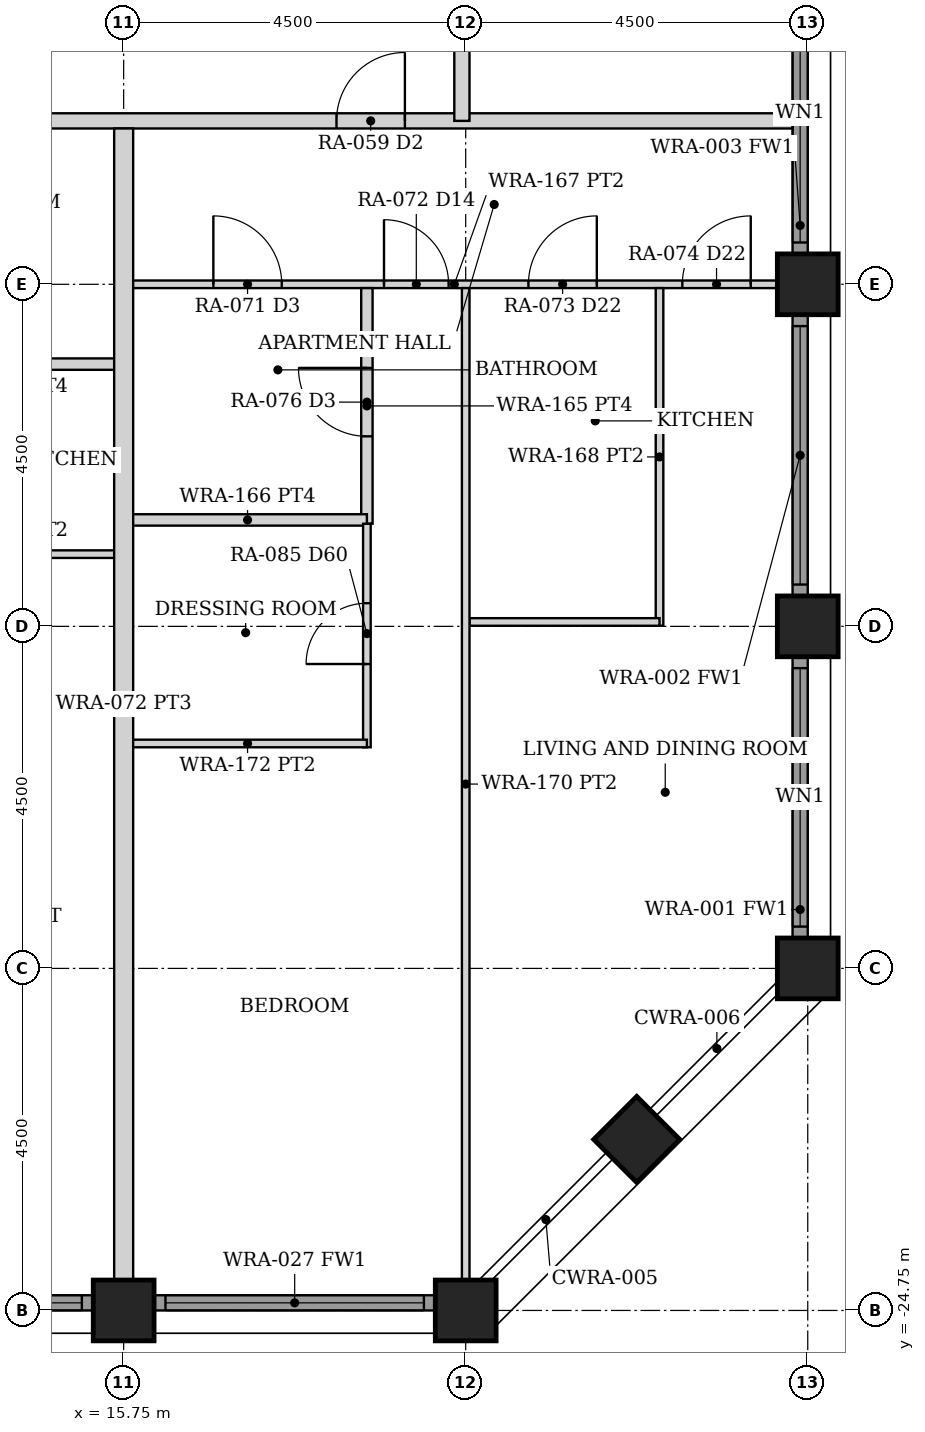
"""IFC4 building model, lengths in metres.
Left out: names, types, materials, properties, quantities, classifications, styles, units other than length and angle.
Written with IfcOpenShell. Run it as: python <this file> out.ifc"""

import sys

from ifc_helpers import new_model, si_unit, direction, frame, frame_2d, origin, origin_2d, place, context, subcontext, project, spatial, rectangle, hollow_rectangle, extrude, element, fill, save


model = new_model("IFC4")
c1 = context("Model", 3, precision=1e-05, world=origin(), true_north=direction((0.0, 1.0)))
c2 = subcontext(c1, "Body", "Model", "MODEL_VIEW")
j1 = project(units=[si_unit("LENGTHUNIT", "METRE"), si_unit("PLANEANGLEUNIT", "RADIAN")], contexts=[c1])
p1 = place(None, origin())
s1 = spatial("IfcSite", under=j1, at=p1, CompositionType="ELEMENT")
p2 = place(p1, origin())
s2 = spatial("IfcBuilding", under=s1, at=p2, CompositionType="ELEMENT")
p3 = place(p2, frame((0.0, 0.0, 30.0)))
s3 = spatial("IfcBuildingStorey", under=s2, at=p3, CompositionType="ELEMENT", Elevation=30.0)
for number, where, z_axis, x_axis in (
    (1, (24.75, -20.25, 0.0), (0.0, 0.0, 1.0), (1.0, 0.0, 0.0)),
    (2, (24.75, -15.75, 0.0), (0.0, 0.0, 1.0), (1.0, 0.0, 0.0)),
    (3, (24.75, -11.25, 0.0), (0.0, 0.0, 1.0), (1.0, 0.0, 0.0)),
    (4, (15.75, -24.75, 0.0), (0.0, 0.0, 1.0), (0.0, 1.0, 0.0)),
    (5, (20.25, -24.75, 0.0), (0.0, 0.0, 1.0), (0.0, 1.0, 0.0)),
    (6, (22.5, -22.5, 0.0), (0.0, 0.0, 1.0), (0.707, -0.707, 0.0)),
):
    element("IfcColumn", number, at=place(p3, frame(where, z_axis=z_axis, x_axis=x_axis)), inside=s3, PredefinedType="COLUMN", context=c2, shape_type="SweptSolid", body=[
        extrude(hollow_rectangle(XDim=0.8, YDim=0.8, WallThickness=0.08, at=origin_2d()), origin(), (0.0, 0.0, 1.0), 3.5),
    ])
p4 = place(p3, frame((11.655, -24.65, 0.0), z_axis=(0.0, 0.0, 1.0), x_axis=(1.0, 0.0, 0.0)))
e7 = element("IfcWall", 7, at=p4, inside=s3, PredefinedType="SOLIDWALL", context=c2, shape_type="SweptSolid", body=[
    extrude(rectangle(XDim=3.69, YDim=0.2, at=frame_2d((1.845, 0.0))), origin(), (0.0, 0.0, 1.0), 2.379),
])
p5 = place(p4, frame((0.145, 0.0, 0.3)))
e8 = element("IfcOpeningElement", 8, at=p5, cuts=e7, PredefinedType="OPENING", context=c2, shape_type="SweptSolid", body=[
    extrude(rectangle(XDim=3.4, YDim=1.929, at=frame_2d((1.7, 0.964))), frame((0.0, 0.11, 0.0), z_axis=(0.0, -1.0, 0.0), x_axis=(1.0, 0.0, 0.0)), (0.0, 0.0, 1.0), 0.22),
])
p6 = place(p3, frame((16.155, -24.65, 0.0), z_axis=(0.0, 0.0, 1.0), x_axis=(1.0, 0.0, 0.0)))
e9 = element("IfcWall", 9, at=p6, inside=s3, PredefinedType="SOLIDWALL", context=c2, shape_type="SweptSolid", body=[
    extrude(rectangle(XDim=3.69, YDim=0.2, at=frame_2d((1.845, 0.0))), origin(), (0.0, 0.0, 1.0), 2.379),
])
p7 = place(p6, frame((0.145, 0.0, 0.3)))
e10 = element("IfcOpeningElement", 10, at=p7, cuts=e9, PredefinedType="OPENING", context=c2, shape_type="SweptSolid", body=[
    extrude(rectangle(XDim=3.4, YDim=1.929, at=frame_2d((1.7, 0.964))), frame((0.0, 0.11, 0.0), z_axis=(0.0, -1.0, 0.0), x_axis=(1.0, 0.0, 0.0)), (0.0, 0.0, 1.0), 0.22),
])
p8 = place(p3, frame((24.65, -19.845, 0.0), z_axis=(0.0, 0.0, 1.0), x_axis=(0.0, 1.0, 0.0)))
e11 = element("IfcWall", 11, at=p8, inside=s3, PredefinedType="SOLIDWALL", context=c2, shape_type="SweptSolid", body=[
    extrude(rectangle(XDim=3.69, YDim=0.2, at=frame_2d((1.845, 0.0))), origin(), (0.0, 0.0, 1.0), 2.379),
])
p9 = place(p8, frame((0.145, 0.0, 0.3)))
e12 = element("IfcOpeningElement", 12, at=p9, cuts=e11, PredefinedType="OPENING", context=c2, shape_type="SweptSolid", body=[
    extrude(rectangle(XDim=3.4, YDim=1.929, at=frame_2d((1.7, 0.964))), frame((0.0, 0.11, 0.0), z_axis=(0.0, -1.0, 0.0), x_axis=(1.0, 0.0, 0.0)), (0.0, 0.0, 1.0), 0.22),
])
p10 = place(p3, frame((24.65, -15.345, 0.0), z_axis=(0.0, 0.0, 1.0), x_axis=(0.0, 1.0, 0.0)))
e13 = element("IfcWall", 13, at=p10, inside=s3, PredefinedType="SOLIDWALL", context=c2, shape_type="SweptSolid", body=[
    extrude(rectangle(XDim=3.69, YDim=0.2, at=frame_2d((1.845, 0.0))), origin(), (0.0, 0.0, 1.0), 2.379),
])
p11 = place(p10, frame((0.145, 0.0, 0.3)))
e14 = element("IfcOpeningElement", 14, at=p11, cuts=e13, PredefinedType="OPENING", context=c2, shape_type="SweptSolid", body=[
    extrude(rectangle(XDim=3.4, YDim=1.929, at=frame_2d((1.7, 0.964))), frame((0.0, 0.11, 0.0), z_axis=(0.0, -1.0, 0.0), x_axis=(1.0, 0.0, 0.0)), (0.0, 0.0, 1.0), 0.22),
])
p12 = place(p3, frame((24.65, -10.845, 0.0), z_axis=(0.0, 0.0, 1.0), x_axis=(0.0, 1.0, 0.0)))
e15 = element("IfcWall", 15, at=p12, inside=s3, PredefinedType="SOLIDWALL", context=c2, shape_type="SweptSolid", body=[
    extrude(rectangle(XDim=3.69, YDim=0.2, at=frame_2d((1.845, 0.0))), origin(), (0.0, 0.0, 1.0), 2.379),
])
p13 = place(p12, frame((0.145, 0.0, 0.3)))
e16 = element("IfcOpeningElement", 16, at=p13, cuts=e15, PredefinedType="OPENING", context=c2, shape_type="SweptSolid", body=[
    extrude(rectangle(XDim=3.4, YDim=1.929, at=frame_2d((1.7, 0.964))), frame((0.0, 0.11, 0.0), z_axis=(0.0, -1.0, 0.0), x_axis=(1.0, 0.0, 0.0)), (0.0, 0.0, 1.0), 0.22),
])
p14 = place(p3, frame((-24.55, -9.1, 0.0), z_axis=(0.0, 0.0, 1.0), x_axis=(1.0, 0.0, 0.0)))
e17 = element("IfcWall", 17, at=p14, inside=s3, PredefinedType="PARTITIONING", context=c2, shape_type="SweptSolid", body=[
    extrude(rectangle(XDim=49.1, YDim=0.2, at=frame_2d((24.55, 0.0))), origin(), (0.0, 0.0, 1.0), 2.373),
])
p15 = place(p14, frame((5.1, 0.0, 0.0)))
e18 = element("IfcOpeningElement", 18, at=p15, cuts=e17, PredefinedType="OPENING", context=c2, shape_type="SweptSolid", body=[
    extrude(rectangle(XDim=0.9, YDim=2.1, at=frame_2d((0.45, 1.05))), frame((0.0, 0.11, 0.0), z_axis=(0.0, -1.0, 0.0), x_axis=(1.0, 0.0, 0.0)), (0.0, 0.0, 1.0), 0.22),
])
p16 = place(p14, frame((9.0, 0.0, 0.0)))
e19 = element("IfcOpeningElement", 19, at=p16, cuts=e17, PredefinedType="OPENING", context=c2, shape_type="SweptSolid", body=[
    extrude(rectangle(XDim=0.9, YDim=2.1, at=frame_2d((0.45, 1.05))), frame((0.0, 0.11, 0.0), z_axis=(0.0, -1.0, 0.0), x_axis=(1.0, 0.0, 0.0)), (0.0, 0.0, 1.0), 0.22),
])
p17 = place(p14, frame((13.5, 0.0, 0.0)))
e20 = element("IfcOpeningElement", 20, at=p17, cuts=e17, PredefinedType="OPENING", context=c2, shape_type="SweptSolid", body=[
    extrude(rectangle(XDim=0.9, YDim=2.1, at=frame_2d((0.45, 1.05))), frame((0.0, 0.11, 0.0), z_axis=(0.0, -1.0, 0.0), x_axis=(1.0, 0.0, 0.0)), (0.0, 0.0, 1.0), 0.22),
])
p18 = place(p14, frame((18.0, 0.0, 0.0)))
e21 = element("IfcOpeningElement", 21, at=p18, cuts=e17, PredefinedType="OPENING", context=c2, shape_type="SweptSolid", body=[
    extrude(rectangle(XDim=0.9, YDim=2.1, at=frame_2d((0.45, 1.05))), frame((0.0, 0.11, 0.0), z_axis=(0.0, -1.0, 0.0), x_axis=(1.0, 0.0, 0.0)), (0.0, 0.0, 1.0), 0.22),
])
p19 = place(p14, frame((22.5, 0.0, 0.0)))
e22 = element("IfcOpeningElement", 22, at=p19, cuts=e17, PredefinedType="OPENING", context=c2, shape_type="SweptSolid", body=[
    extrude(rectangle(XDim=0.9, YDim=2.1, at=frame_2d((0.45, 1.05))), frame((0.0, 0.11, 0.0), z_axis=(0.0, -1.0, 0.0), x_axis=(1.0, 0.0, 0.0)), (0.0, 0.0, 1.0), 0.22),
])
p20 = place(p14, frame((27.0, 0.0, 0.0)))
e23 = element("IfcOpeningElement", 23, at=p20, cuts=e17, PredefinedType="OPENING", context=c2, shape_type="SweptSolid", body=[
    extrude(rectangle(XDim=0.9, YDim=2.1, at=frame_2d((0.45, 1.05))), frame((0.0, 0.11, 0.0), z_axis=(0.0, -1.0, 0.0), x_axis=(1.0, 0.0, 0.0)), (0.0, 0.0, 1.0), 0.22),
])
p21 = place(p14, frame((31.5, 0.0, 0.0)))
e24 = element("IfcOpeningElement", 24, at=p21, cuts=e17, PredefinedType="OPENING", context=c2, shape_type="SweptSolid", body=[
    extrude(rectangle(XDim=0.9, YDim=2.1, at=frame_2d((0.45, 1.05))), frame((0.0, 0.11, 0.0), z_axis=(0.0, -1.0, 0.0), x_axis=(1.0, 0.0, 0.0)), (0.0, 0.0, 1.0), 0.22),
])
p22 = place(p14, frame((36.0, 0.0, 0.0)))
e25 = element("IfcOpeningElement", 25, at=p22, cuts=e17, PredefinedType="OPENING", context=c2, shape_type="SweptSolid", body=[
    extrude(rectangle(XDim=0.9, YDim=2.1, at=frame_2d((0.45, 1.05))), frame((0.0, 0.11, 0.0), z_axis=(0.0, -1.0, 0.0), x_axis=(1.0, 0.0, 0.0)), (0.0, 0.0, 1.0), 0.22),
])
p23 = place(p14, frame((43.1, 0.0, 0.0)))
e26 = element("IfcOpeningElement", 26, at=p23, cuts=e17, PredefinedType="OPENING", context=c2, shape_type="SweptSolid", body=[
    extrude(rectangle(XDim=0.9, YDim=2.1, at=frame_2d((0.45, 1.05))), frame((0.0, 0.11, 0.0), z_axis=(0.0, -1.0, 0.0), x_axis=(1.0, 0.0, 0.0)), (0.0, 0.0, 1.0), 0.22),
])
p24 = place(p3, frame((20.2, -9.1, 0.0), z_axis=(0.0, 0.0, 1.0), x_axis=(0.0, 1.0, 0.0)))
e27 = element("IfcWall", 27, at=p24, inside=s3, PredefinedType="PARTITIONING", context=c2, shape_type="SweptSolid", body=[
    extrude(rectangle(XDim=18.2, YDim=0.2, at=frame_2d((9.1, 0.0))), origin(), (0.0, 0.0, 1.0), 2.373),
])
p25 = place(p24, frame((6.4, 0.0, 0.0)))
e28 = element("IfcOpeningElement", 28, at=p25, cuts=e27, PredefinedType="OPENING", context=c2, shape_type="SweptSolid", body=[
    extrude(rectangle(XDim=0.9, YDim=2.1, at=frame_2d((0.45, 1.05))), frame((0.0, 0.11, 0.0), z_axis=(0.0, -1.0, 0.0), x_axis=(1.0, 0.0, 0.0)), (0.0, 0.0, 1.0), 0.22),
])
p26 = place(p3, frame((12.6, -12.3, 0.0), z_axis=(0.0, 0.0, 1.0), x_axis=(1.0, 0.0, 0.0)))
e29 = element("IfcWall", 29, at=p26, inside=s3, PredefinedType="PARTITIONING", context=c2, shape_type="SweptSolid", body=[
    extrude(rectangle(XDim=3.05, YDim=0.15, at=frame_2d((1.525, 0.0))), origin(), (0.0, 0.0, 1.0), 2.373),
])
p27 = place(p3, frame((12.6, -14.8, 0.0), z_axis=(0.0, 0.0, 1.0), x_axis=(1.0, 0.0, 0.0)))
e30 = element("IfcWall", 30, at=p27, inside=s3, PredefinedType="PARTITIONING", context=c2, shape_type="SweptSolid", body=[
    extrude(rectangle(XDim=3.05, YDim=0.1, at=frame_2d((1.525, 0.0))), origin(), (0.0, 0.0, 1.0), 2.373),
])
p28 = place(p3, frame((15.85, -11.25, 0.0), z_axis=(0.0, 0.0, 1.0), x_axis=(1.0, 0.0, 0.0)))
e31 = element("IfcWall", 31, at=p28, inside=s3, PredefinedType="PARTITIONING", context=c2, shape_type="SweptSolid", body=[
    extrude(rectangle(XDim=8.5, YDim=0.1, at=frame_2d((4.25, 0.0))), origin(), (0.0, 0.0, 1.0), 2.373),
])
p29 = place(p28, frame((5.225, 0.0, 0.0)))
e32 = element("IfcOpeningElement", 32, at=p29, cuts=e31, PredefinedType="OPENING", context=c2, shape_type="SweptSolid", body=[
    extrude(rectangle(XDim=0.9, YDim=2.1, at=frame_2d((0.45, 1.05))), frame((0.0, 0.06, 0.0), z_axis=(0.0, -1.0, 0.0), x_axis=(1.0, 0.0, 0.0)), (0.0, 0.0, 1.0), 0.12),
])
p30 = place(p28, frame((7.25, 0.0, 0.0)))
e33 = element("IfcOpeningElement", 33, at=p30, cuts=e31, PredefinedType="OPENING", context=c2, shape_type="SweptSolid", body=[
    extrude(rectangle(XDim=0.9, YDim=2.1, at=frame_2d((0.45, 1.05))), frame((0.0, 0.06, 0.0), z_axis=(0.0, -1.0, 0.0), x_axis=(1.0, 0.0, 0.0)), (0.0, 0.0, 1.0), 0.12),
])
p31 = place(p28, frame((3.325, 0.0, 0.0)))
e34 = element("IfcOpeningElement", 34, at=p31, cuts=e31, PredefinedType="OPENING", context=c2, shape_type="SweptSolid", body=[
    extrude(rectangle(XDim=0.85, YDim=2.1, at=frame_2d((0.425, 1.05))), frame((0.0, 0.06, 0.0), z_axis=(0.0, -1.0, 0.0), x_axis=(1.0, 0.0, 0.0)), (0.0, 0.0, 1.0), 0.12),
])
p32 = place(p28, frame((1.08, 0.0, 0.0)))
e35 = element("IfcOpeningElement", 35, at=p32, cuts=e31, PredefinedType="OPENING", context=c2, shape_type="SweptSolid", body=[
    extrude(rectangle(XDim=0.9, YDim=2.1, at=frame_2d((0.45, 1.05))), frame((0.0, 0.06, 0.0), z_axis=(0.0, -1.0, 0.0), x_axis=(1.0, 0.0, 0.0)), (0.0, 0.0, 1.0), 0.12),
])
p33 = place(p3, frame((22.8, -15.742, 0.0), z_axis=(0.0, 0.0, 1.0), x_axis=(0.0, 1.0, 0.0)))
e36 = element("IfcWall", 36, at=p33, inside=s3, PredefinedType="PARTITIONING", context=c2, shape_type="SweptSolid", body=[
    extrude(rectangle(XDim=4.442, YDim=0.1, at=frame_2d((2.221, 0.0))), origin(), (0.0, 0.0, 1.0), 2.373),
])
p34 = place(p3, frame((20.3, -15.692, 0.0), z_axis=(0.0, 0.0, 1.0), x_axis=(1.0, 0.0, 0.0)))
e37 = element("IfcWall", 37, at=p34, inside=s3, PredefinedType="PARTITIONING", context=c2, shape_type="SweptSolid", body=[
    extrude(rectangle(XDim=2.5, YDim=0.1, at=frame_2d((1.25, 0.0))), origin(), (0.0, 0.0, 1.0), 2.373),
])
p35 = place(p3, frame((20.25, -24.35, 0.0), z_axis=(0.0, 0.0, 1.0), x_axis=(0.0, 1.0, 0.0)))
e38 = element("IfcWall", 38, at=p35, inside=s3, PredefinedType="PARTITIONING", context=c2, shape_type="SweptSolid", body=[
    extrude(rectangle(XDim=13.05, YDim=0.1, at=frame_2d((6.525, 0.0))), origin(), (0.0, 0.0, 1.0), 2.373),
])
p36 = place(p3, frame((18.95, -14.4, 0.0), z_axis=(0.0, 0.0, 1.0), x_axis=(0.0, 1.0, 0.0)))
e39 = element("IfcWall", 39, at=p36, inside=s3, PredefinedType="PARTITIONING", context=c2, shape_type="SweptSolid", body=[
    extrude(rectangle(XDim=3.1, YDim=0.15, at=frame_2d((1.55, 0.0))), origin(), (0.0, 0.0, 1.0), 2.373),
])
p37 = place(p36, frame((1.15, 0.0, 0.0)))
e40 = element("IfcOpeningElement", 40, at=p37, cuts=e39, PredefinedType="OPENING", context=c2, shape_type="SweptSolid", body=[
    extrude(rectangle(XDim=0.9, YDim=2.1, at=frame_2d((0.45, 1.05))), frame((0.0, 0.085, 0.0), z_axis=(0.0, -1.0, 0.0), x_axis=(1.0, 0.0, 0.0)), (0.0, 0.0, 1.0), 0.17),
])
p38 = place(p3, frame((15.81, -14.35, 0.0), z_axis=(0.0, 0.0, 1.0), x_axis=(1.0, 0.0, 0.0)))
e41 = element("IfcWall", 41, at=p38, inside=s3, PredefinedType="PARTITIONING", context=c2, shape_type="SweptSolid", body=[
    extrude(rectangle(XDim=3.14, YDim=0.15, at=frame_2d((1.57, 0.0))), origin(), (0.0, 0.0, 1.0), 2.373),
])
p39 = place(p3, frame((18.95, -17.341, 0.0), z_axis=(0.0, 0.0, 1.0), x_axis=(0.0, 1.0, 0.0)))
e42 = element("IfcWall", 42, at=p39, inside=s3, PredefinedType="PARTITIONING", context=c2, shape_type="SweptSolid", body=[
    extrude(rectangle(XDim=2.941, YDim=0.1, at=frame_2d((1.47, 0.0))), origin(), (0.0, 0.0, 1.0), 2.373),
])
p40 = place(p39, frame((1.095, 0.0, 0.0)))
e43 = element("IfcOpeningElement", 43, at=p40, cuts=e42, PredefinedType="OPENING", context=c2, shape_type="SweptSolid", body=[
    extrude(rectangle(XDim=0.8, YDim=2.1, at=frame_2d((0.4, 1.05))), frame((0.0, 0.06, 0.0), z_axis=(0.0, -1.0, 0.0), x_axis=(1.0, 0.0, 0.0)), (0.0, 0.0, 1.0), 0.12),
])
p41 = place(p3, frame((15.81, -17.291, 0.0), z_axis=(0.0, 0.0, 1.0), x_axis=(1.0, 0.0, 0.0)))
e44 = element("IfcWall", 44, at=p41, inside=s3, PredefinedType="PARTITIONING", context=c2, shape_type="SweptSolid", body=[
    extrude(rectangle(XDim=3.14, YDim=0.1, at=frame_2d((1.57, 0.0))), origin(), (0.0, 0.0, 1.0), 2.373),
])
p42 = place(p3, frame((15.75, -24.35, 0.0), z_axis=(0.0, 0.0, 1.0), x_axis=(0.0, 1.0, 0.0)))
e45 = element("IfcWall", 45, at=p42, inside=s3, PredefinedType="PARTITIONING", context=c2, shape_type="SweptSolid", body=[
    extrude(rectangle(XDim=15.15, YDim=0.25, at=frame_2d((7.575, 0.0))), origin(), (0.0, 0.0, 1.0), 2.373),
])
p43 = place(p5, origin())
e46 = element("IfcWindow", 46, at=p43, inside=s3, PartitioningType="SINGLE_PANEL", PredefinedType="WINDOW", context=c2, shape_type="SweptSolid", body=[
    extrude(rectangle(XDim=3.4, YDim=1.929, at=frame_2d((1.7, 0.964))), frame((0.0, 0.03, 0.0), z_axis=(0.0, -1.0, 0.0), x_axis=(1.0, 0.0, 0.0)), (0.0, 0.0, 1.0), 0.06),
])
fill(e8, e46)
p44 = place(p7, origin())
e47 = element("IfcWindow", 47, at=p44, inside=s3, PartitioningType="SINGLE_PANEL", PredefinedType="WINDOW", context=c2, shape_type="SweptSolid", body=[
    extrude(rectangle(XDim=3.4, YDim=1.929, at=frame_2d((1.7, 0.964))), frame((0.0, 0.03, 0.0), z_axis=(0.0, -1.0, 0.0), x_axis=(1.0, 0.0, 0.0)), (0.0, 0.0, 1.0), 0.06),
])
fill(e10, e47)
p45 = place(p9, origin())
e48 = element("IfcWindow", 48, at=p45, inside=s3, PartitioningType="SINGLE_PANEL", PredefinedType="WINDOW", context=c2, shape_type="SweptSolid", body=[
    extrude(rectangle(XDim=3.4, YDim=1.929, at=frame_2d((1.7, 0.964))), frame((0.0, 0.03, 0.0), z_axis=(0.0, -1.0, 0.0), x_axis=(1.0, 0.0, 0.0)), (0.0, 0.0, 1.0), 0.06),
])
fill(e12, e48)
p46 = place(p11, origin())
e49 = element("IfcWindow", 49, at=p46, inside=s3, PartitioningType="SINGLE_PANEL", PredefinedType="WINDOW", context=c2, shape_type="SweptSolid", body=[
    extrude(rectangle(XDim=3.4, YDim=1.929, at=frame_2d((1.7, 0.964))), frame((0.0, 0.03, 0.0), z_axis=(0.0, -1.0, 0.0), x_axis=(1.0, 0.0, 0.0)), (0.0, 0.0, 1.0), 0.06),
])
fill(e14, e49)
p47 = place(p13, origin())
e50 = element("IfcWindow", 50, at=p47, inside=s3, PartitioningType="SINGLE_PANEL", PredefinedType="WINDOW", context=c2, shape_type="SweptSolid", body=[
    extrude(rectangle(XDim=3.4, YDim=1.929, at=frame_2d((1.7, 0.964))), frame((0.0, 0.03, 0.0), z_axis=(0.0, -1.0, 0.0), x_axis=(1.0, 0.0, 0.0)), (0.0, 0.0, 1.0), 0.06),
])
fill(e16, e50)
p48 = place(p23, origin())
e51 = element("IfcDoor", 51, at=p48, inside=s3, OperationType="SINGLE_SWING_RIGHT", PredefinedType="DOOR", context=c2, shape_type="SweptSolid", body=[
    extrude(rectangle(XDim=0.9, YDim=2.1, at=frame_2d((0.45, 1.05))), frame((0.0, 0.025, 0.0), z_axis=(0.0, -1.0, 0.0), x_axis=(1.0, 0.0, 0.0)), (0.0, 0.0, 1.0), 0.05),
])
fill(e26, e51)
p49 = place(p29, origin())
e52 = element("IfcDoor", 52, at=p49, inside=s3, OperationType="SINGLE_SWING_RIGHT", PredefinedType="DOOR", context=c2, shape_type="SweptSolid", body=[
    extrude(rectangle(XDim=0.9, YDim=2.1, at=frame_2d((0.45, 1.05))), frame((0.0, 0.025, 0.0), z_axis=(0.0, -1.0, 0.0), x_axis=(1.0, 0.0, 0.0)), (0.0, 0.0, 1.0), 0.05),
])
fill(e32, e52)
p50 = place(p30, origin())
e53 = element("IfcDoor", 53, at=p50, inside=s3, OperationType="SINGLE_SWING_RIGHT", PredefinedType="DOOR", context=c2, shape_type="SweptSolid", body=[
    extrude(rectangle(XDim=0.9, YDim=2.1, at=frame_2d((0.45, 1.05))), frame((0.0, 0.025, 0.0), z_axis=(0.0, -1.0, 0.0), x_axis=(1.0, 0.0, 0.0)), (0.0, 0.0, 1.0), 0.05),
])
fill(e33, e53)
p51 = place(p31, origin())
e54 = element("IfcDoor", 54, at=p51, inside=s3, OperationType="SINGLE_SWING_LEFT", PredefinedType="DOOR", context=c2, shape_type="SweptSolid", body=[
    extrude(rectangle(XDim=0.85, YDim=2.1, at=frame_2d((0.425, 1.05))), frame((0.0, 0.025, 0.0), z_axis=(0.0, -1.0, 0.0), x_axis=(1.0, 0.0, 0.0)), (0.0, 0.0, 1.0), 0.05),
])
fill(e34, e54)
p52 = place(p37, origin())
e55 = element("IfcDoor", 55, at=p52, inside=s3, OperationType="SINGLE_SWING_RIGHT", PredefinedType="DOOR", context=c2, shape_type="SweptSolid", body=[
    extrude(rectangle(XDim=0.9, YDim=2.1, at=frame_2d((0.45, 1.05))), frame((0.0, 0.025, 0.0), z_axis=(0.0, -1.0, 0.0), x_axis=(1.0, 0.0, 0.0)), (0.0, 0.0, 1.0), 0.05),
])
fill(e40, e55)
p53 = place(p32, origin())
e56 = element("IfcDoor", 56, at=p53, inside=s3, OperationType="SINGLE_SWING_LEFT", PredefinedType="DOOR", context=c2, shape_type="SweptSolid", body=[
    extrude(rectangle(XDim=0.9, YDim=2.1, at=frame_2d((0.45, 1.05))), frame((0.0, 0.025, 0.0), z_axis=(0.0, -1.0, 0.0), x_axis=(1.0, 0.0, 0.0)), (0.0, 0.0, 1.0), 0.05),
])
fill(e35, e56)
p54 = place(p40, origin())
e57 = element("IfcDoor", 57, at=p54, inside=s3, OperationType="SINGLE_SWING_LEFT", PredefinedType="DOOR", context=c2, shape_type="SweptSolid", body=[
    extrude(rectangle(XDim=0.8, YDim=2.1, at=frame_2d((0.4, 1.05))), frame((0.0, 0.025, 0.0), z_axis=(0.0, -1.0, 0.0), x_axis=(1.0, 0.0, 0.0)), (0.0, 0.0, 1.0), 0.05),
])
fill(e43, e57)
save(model, sys.argv[1])
